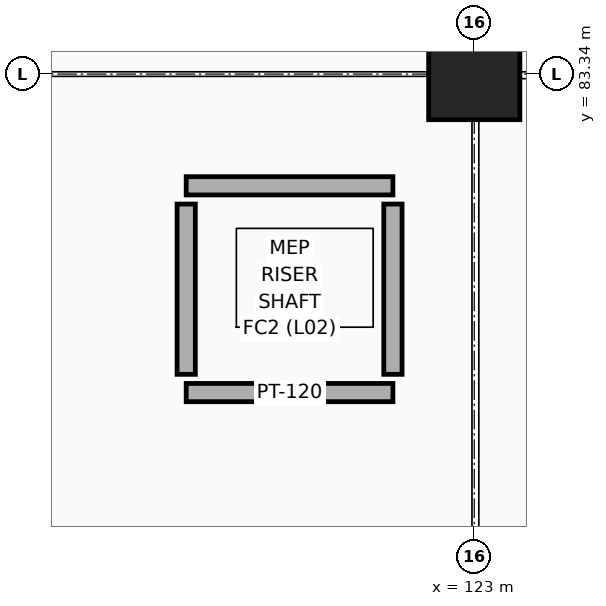
"""IFC4 building model, lengths in metres.
Left out: names, types, materials, properties, quantities, classifications, styles, units other than length and angle.
Written with IfcOpenShell. Run it as: python <this file> out.ifc"""

import sys

from ifc_helpers import new_model, si_unit, direction, frame, frame_2d, origin, origin_2d, place, context, subcontext, project, spatial, rectangle, extrude, element, save


model = new_model("IFC4")
c1 = context("Model", 3, precision=1e-05, world=origin(), true_north=direction((0.0, 1.0)))
c2 = subcontext(c1, "Body", "Model", "MODEL_VIEW")
j1 = project(units=[si_unit("LENGTHUNIT", "METRE"), si_unit("PLANEANGLEUNIT", "RADIAN")], contexts=[c1])
p1 = place(None, origin())
s1 = spatial("IfcSite", under=j1, at=p1, CompositionType="ELEMENT")
p2 = place(p1, origin())
s2 = spatial("IfcBuilding", under=s1, at=p2, CompositionType="ELEMENT")
p3 = place(p2, frame((0.0, 0.0, 10.2)))
s3 = spatial("IfcBuildingStorey", under=s2, at=p3, CompositionType="ELEMENT", Elevation=10.2)
p4 = place(p3, frame((123.0, 83.34, 0.0), z_axis=(0.0, 0.0, 1.0), x_axis=(1.0, 0.0, 0.0)))
e1 = element("IfcColumn", 1, at=p4, inside=s3, PredefinedType="COLUMN", context=c2, shape_type="SweptSolid", body=[
    extrude(rectangle(XDim=0.6, YDim=0.6, at=origin_2d()), origin(), (0.0, 0.0, 1.0), 4.5),
])
for number, where, z_axis, x_axis in (
    (2, (121.105, 81.245, 0.0), (0.0, 0.0, 1.0), (1.0, 0.0, 0.0)),
    (3, (121.105, 82.605, 0.0), (0.0, 0.0, 1.0), (1.0, 0.0, 0.0)),
):
    element("IfcWall", number, at=place(p3, frame(where, z_axis=z_axis, x_axis=x_axis)), inside=s3, PredefinedType="PARTITIONING", context=c2, shape_type="SweptSolid", body=[
        extrude(rectangle(XDim=1.36, YDim=0.12, at=frame_2d((0.68, 0.0))), origin(), (0.0, 0.0, 1.0), 4.205),
    ])
for number, where, z_axis, x_axis in (
    (4, (121.105, 81.365, 0.0), (0.0, 0.0, 1.0), (0.0, 1.0, 0.0)),
    (5, (122.465, 81.365, 0.0), (0.0, 0.0, 1.0), (0.0, 1.0, 0.0)),
):
    element("IfcWall", number, at=place(p3, frame(where, z_axis=z_axis, x_axis=x_axis)), inside=s3, PredefinedType="PARTITIONING", context=c2, shape_type="SweptSolid", body=[
        extrude(rectangle(XDim=1.12, YDim=0.12, at=frame_2d((0.56, 0.0))), origin(), (0.0, 0.0, 1.0), 4.205),
    ])
save(model, sys.argv[1])
